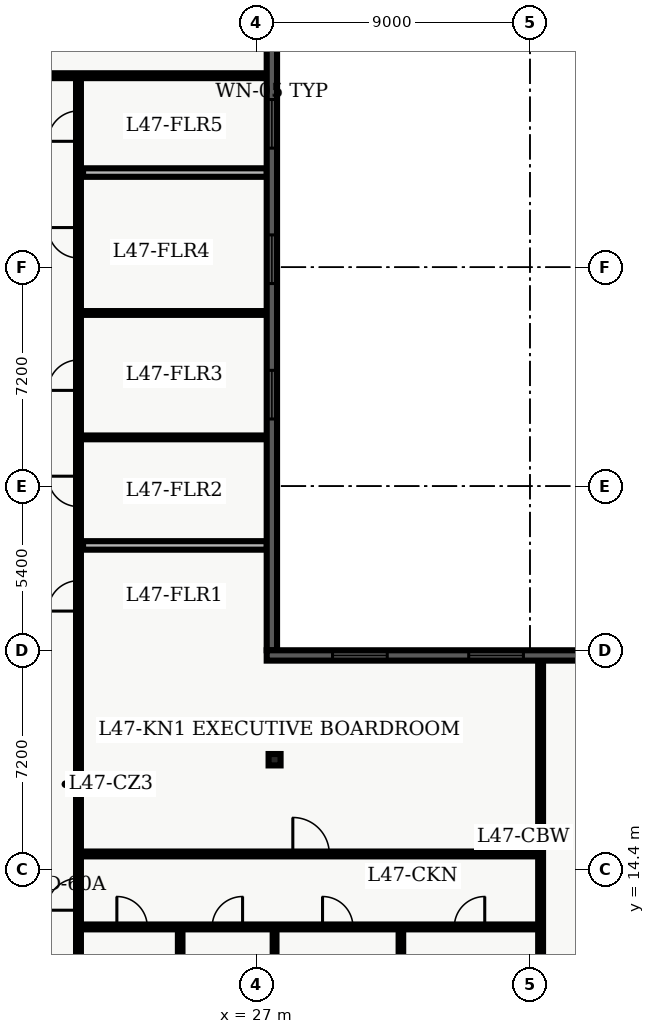
"""IFC4 building model, lengths in metres.
Left out: names, types, materials, properties, quantities, classifications, styles, units other than length and angle.
Written with IfcOpenShell. Run it as: python <this file> out.ifc"""

import sys

from ifc_helpers import new_model, entity, si_unit, converted_unit, direction, frame, origin_with_axes, origin_2d_with_axis, place, context, subcontext, project, spatial, polyline, rectangle, i_section, outline, extrude, element, fill, save


model = new_model("IFC4")
c1 = context("Model", 3, precision=1e-05, world=origin_with_axes(), true_north=direction((0.0, 1.0)))
c2 = subcontext(c1, "Body", "Model", "MODEL_VIEW")
j1 = project(units=[si_unit("LENGTHUNIT", "METRE"), converted_unit("PLANEANGLEUNIT", "DEGREE", entity("IfcPlaneAngleMeasure", 0.017), si_unit("PLANEANGLEUNIT", "RADIAN"), dimensions=[0, 0, 0, 0, 0, 0, 0])], contexts=[c1])
p1 = place(None, origin_with_axes())
s1 = spatial("IfcSite", under=j1, at=p1, CompositionType="ELEMENT")
p2 = place(p1, origin_with_axes())
s2 = spatial("IfcBuilding", under=s1, at=p2, CompositionType="ELEMENT")
p3 = place(p2, frame((0.0, 0.0, 192.6), z_axis=(0.0, 0.0, 1.0), x_axis=(1.0, 0.0, 0.0)))
s3 = spatial("IfcBuildingStorey", under=s2, at=p3, CompositionType="ELEMENT", Elevation=192.6)
p4 = place(p3, frame((27.6, 18.0, 0.0), z_axis=(0.0, 0.0, 1.0), x_axis=(1.0, 0.0, 0.0)))
e1 = element("IfcColumn", 1, at=p4, inside=s3, PredefinedType="COLUMN", context=c2, shape_type="SweptSolid", body=[
    extrude(i_section(OverallWidth=0.394, OverallDepth=0.375, WebThickness=0.017, FlangeThickness=0.028, FilletRadius=0.02, at=origin_2d_with_axis()), origin_with_axes(), (0.0, 0.0, 1.0), 3.9),
])
p5 = place(p3, frame((2.6, 40.5, 0.0), z_axis=(0.0, 0.0, 1.0), x_axis=(1.0, 0.0, 0.0)))
e2 = element("IfcWall", 2, at=p5, inside=s3, PredefinedType="PARTITIONING", context=c2, shape_type="SweptSolid", body=[
    extrude(outline(polyline([(0.0, -0.08), (24.746, -0.08), (24.746, 0.08), (0.0, 0.08), (0.0, -0.08)])), origin_with_axes(), (0.0, 0.0, 1.0), 2.7),
])
p6 = place(p5, frame((1.554, 0.0, 0.0), z_axis=(0.0, 0.0, 1.0), x_axis=(1.0, 0.0, 0.0)))
e3 = element("IfcOpeningElement", 3, at=p6, cuts=e2, PredefinedType="OPENING", context=c2, shape_type="SweptSolid", body=[
    extrude(rectangle(XDim=1.0, YDim=0.18, at=origin_2d_with_axis()), origin_with_axes(), (0.0, 0.0, 1.0), 2.15),
])
p7 = place(p5, frame((6.84, 0.0, 0.0), z_axis=(0.0, 0.0, 1.0), x_axis=(1.0, 0.0, 0.0)))
e4 = element("IfcOpeningElement", 4, at=p7, cuts=e2, PredefinedType="OPENING", context=c2, shape_type="SweptSolid", body=[
    extrude(rectangle(XDim=1.0, YDim=0.18, at=origin_2d_with_axis()), origin_with_axes(), (0.0, 0.0, 1.0), 2.15),
])
p8 = place(p5, frame((11.276, 0.0, 0.0), z_axis=(0.0, 0.0, 1.0), x_axis=(1.0, 0.0, 0.0)))
e5 = element("IfcOpeningElement", 5, at=p8, cuts=e2, PredefinedType="OPENING", context=c2, shape_type="SweptSolid", body=[
    extrude(rectangle(XDim=1.0, YDim=0.18, at=origin_2d_with_axis()), origin_with_axes(), (0.0, 0.0, 1.0), 2.15),
])
p9 = place(p5, frame((15.636, 0.0, 0.0), z_axis=(0.0, 0.0, 1.0), x_axis=(1.0, 0.0, 0.0)))
e6 = element("IfcOpeningElement", 6, at=p9, cuts=e2, PredefinedType="OPENING", context=c2, shape_type="SweptSolid", body=[
    extrude(rectangle(XDim=1.0, YDim=0.18, at=origin_2d_with_axis()), origin_with_axes(), (0.0, 0.0, 1.0), 2.15),
])
p10 = place(p3, frame((21.15, 7.8, 0.0), z_axis=(0.0, 0.0, 1.0), x_axis=(0.0, 1.0, 0.0)))
e7 = element("IfcWall", 7, at=p10, inside=s3, PredefinedType="PARTITIONING", context=c2, shape_type="SweptSolid", body=[
    extrude(outline(polyline([(0.0, -0.08), (32.7, -0.08), (32.7, 0.08), (0.0, 0.08), (0.0, -0.08)])), origin_with_axes(), (0.0, 0.0, 1.0), 2.7),
])
p11 = place(p10, frame((15.589, 0.0, 0.0), z_axis=(0.0, 0.0, 1.0), x_axis=(1.0, 0.0, 0.0)))
e8 = element("IfcOpeningElement", 8, at=p11, cuts=e7, PredefinedType="OPENING", context=c2, shape_type="SweptSolid", body=[
    extrude(rectangle(XDim=1.0, YDim=0.18, at=origin_2d_with_axis()), origin_with_axes(), (0.0, 0.0, 1.0), 2.15),
])
p12 = place(p10, frame((19.026, 0.0, 0.0), z_axis=(0.0, 0.0, 1.0), x_axis=(1.0, 0.0, 0.0)))
e9 = element("IfcOpeningElement", 9, at=p12, cuts=e7, PredefinedType="OPENING", context=c2, shape_type="SweptSolid", body=[
    extrude(rectangle(XDim=1.0, YDim=0.18, at=origin_2d_with_axis()), origin_with_axes(), (0.0, 0.0, 1.0), 2.15),
])
p13 = place(p10, frame((22.849, 0.0, 0.0), z_axis=(0.0, 0.0, 1.0), x_axis=(1.0, 0.0, 0.0)))
e10 = element("IfcOpeningElement", 10, at=p13, cuts=e7, PredefinedType="OPENING", context=c2, shape_type="SweptSolid", body=[
    extrude(rectangle(XDim=1.0, YDim=0.18, at=origin_2d_with_axis()), origin_with_axes(), (0.0, 0.0, 1.0), 2.15),
])
p14 = place(p10, frame((27.204, 0.0, 0.0), z_axis=(0.0, 0.0, 1.0), x_axis=(1.0, 0.0, 0.0)))
e11 = element("IfcOpeningElement", 11, at=p14, cuts=e7, PredefinedType="OPENING", context=c2, shape_type="SweptSolid", body=[
    extrude(rectangle(XDim=1.0, YDim=0.18, at=origin_2d_with_axis()), origin_with_axes(), (0.0, 0.0, 1.0), 2.15),
])
p15 = place(p10, frame((31.042, 0.0, 0.0), z_axis=(0.0, 0.0, 1.0), x_axis=(1.0, 0.0, 0.0)))
e12 = element("IfcOpeningElement", 12, at=p15, cuts=e7, PredefinedType="OPENING", context=c2, shape_type="SweptSolid", body=[
    extrude(rectangle(XDim=1.0, YDim=0.18, at=origin_2d_with_axis()), origin_with_axes(), (0.0, 0.0, 1.0), 2.15),
])
p16 = place(p10, frame((5.775, 0.0, 0.0), z_axis=(0.0, 0.0, 1.0), x_axis=(1.0, 0.0, 0.0)))
e13 = element("IfcOpeningElement", 13, at=p16, cuts=e7, PredefinedType="OPENING", context=c2, shape_type="SweptSolid", body=[
    extrude(rectangle(XDim=1.05, YDim=0.18, at=origin_2d_with_axis()), origin_with_axes(), (0.0, 0.0, 1.0), 2.15),
])
p17 = place(p3, frame((21.3, 25.049, 0.0), z_axis=(0.0, 0.0, 1.0), x_axis=(1.0, 0.0, 0.0)))
e14 = element("IfcWall", 14, at=p17, inside=s3, PredefinedType="PARTITIONING", context=c2, shape_type="SweptSolid", body=[
    extrude(outline(polyline([(0.0, -0.14), (6.046, -0.14), (6.046, 0.14), (0.0, 0.14), (0.0, -0.14)])), origin_with_axes(), (0.0, 0.0, 1.0), 2.7),
])
for number, where, z_axis, x_axis in (
    (15, (21.3, 28.603, 0.0), (0.0, 0.0, 1.0), (1.0, 0.0, 0.0)),
    (16, (21.3, 32.695, 0.0), (0.0, 0.0, 1.0), (1.0, 0.0, 0.0)),
):
    element("IfcWall", number, at=place(p3, frame(where, z_axis=z_axis, x_axis=x_axis)), inside=s3, PredefinedType="PARTITIONING", context=c2, shape_type="SweptSolid", body=[
        extrude(outline(polyline([(0.0, -0.062), (6.046, -0.062), (6.046, 0.062), (0.0, 0.062), (0.0, -0.062)])), origin_with_axes(), (0.0, 0.0, 1.0), 2.7),
    ])
p18 = place(p3, frame((21.3, 37.314, 0.0), z_axis=(0.0, 0.0, 1.0), x_axis=(1.0, 0.0, 0.0)))
e17 = element("IfcWall", 17, at=p18, inside=s3, PredefinedType="PARTITIONING", context=c2, shape_type="SweptSolid", body=[
    extrude(outline(polyline([(0.0, -0.14), (6.046, -0.14), (6.046, 0.14), (0.0, 0.14), (0.0, -0.14)])), origin_with_axes(), (0.0, 0.0, 1.0), 2.7),
])
p19 = place(p3, frame((21.15, 12.5, 0.0), z_axis=(0.0, 0.0, 1.0), x_axis=(1.0, 0.0, 0.0)))
e18 = element("IfcWall", 18, at=p19, inside=s3, PredefinedType="PARTITIONING", context=c2, shape_type="SweptSolid", body=[
    extrude(outline(polyline([(0.0, -0.08), (15.2, -0.08), (15.2, 0.08), (0.0, 0.08), (0.0, -0.08)])), origin_with_axes(), (0.0, 0.0, 1.0), 2.7),
])
p20 = place(p19, frame((1.762, 0.0, 0.0), z_axis=(0.0, 0.0, 1.0), x_axis=(1.0, 0.0, 0.0)))
e19 = element("IfcOpeningElement", 19, at=p20, cuts=e18, PredefinedType="OPENING", context=c2, shape_type="SweptSolid", body=[
    extrude(rectangle(XDim=1.0, YDim=0.18, at=origin_2d_with_axis()), origin_with_axes(), (0.0, 0.0, 1.0), 2.15),
])
p21 = place(p19, frame((4.897, 0.0, 0.0), z_axis=(0.0, 0.0, 1.0), x_axis=(1.0, 0.0, 0.0)))
e20 = element("IfcOpeningElement", 20, at=p21, cuts=e18, PredefinedType="OPENING", context=c2, shape_type="SweptSolid", body=[
    extrude(rectangle(XDim=1.0, YDim=0.18, at=origin_2d_with_axis()), origin_with_axes(), (0.0, 0.0, 1.0), 2.15),
])
p22 = place(p19, frame((8.527, 0.0, 0.0), z_axis=(0.0, 0.0, 1.0), x_axis=(1.0, 0.0, 0.0)))
e21 = element("IfcOpeningElement", 21, at=p22, cuts=e18, PredefinedType="OPENING", context=c2, shape_type="SweptSolid", body=[
    extrude(rectangle(XDim=1.0, YDim=0.18, at=origin_2d_with_axis()), origin_with_axes(), (0.0, 0.0, 1.0), 2.15),
])
p23 = place(p19, frame((12.863, 0.0, 0.0), z_axis=(0.0, 0.0, 1.0), x_axis=(1.0, 0.0, 0.0)))
e22 = element("IfcOpeningElement", 22, at=p23, cuts=e18, PredefinedType="OPENING", context=c2, shape_type="SweptSolid", body=[
    extrude(rectangle(XDim=1.0, YDim=0.18, at=origin_2d_with_axis()), origin_with_axes(), (0.0, 0.0, 1.0), 2.15),
])
p24 = place(p3, frame((21.15, 14.9, 0.0), z_axis=(0.0, 0.0, 1.0), x_axis=(1.0, 0.0, 0.0)))
e23 = element("IfcWall", 23, at=p24, inside=s3, PredefinedType="PARTITIONING", context=c2, shape_type="SweptSolid", body=[
    extrude(outline(polyline([(0.0, -0.08), (15.2, -0.08), (15.2, 0.08), (0.0, 0.08), (0.0, -0.08)])), origin_with_axes(), (0.0, 0.0, 1.0), 2.7),
])
p25 = place(p24, frame((7.65, 0.0, 0.0), z_axis=(0.0, 0.0, 1.0), x_axis=(1.0, 0.0, 0.0)))
e24 = element("IfcOpeningElement", 24, at=p25, cuts=e23, PredefinedType="OPENING", context=c2, shape_type="SweptSolid", body=[
    extrude(rectangle(XDim=1.2, YDim=0.18, at=origin_2d_with_axis()), origin_with_axes(), (0.0, 0.0, 1.0), 2.2),
])
p26 = place(p3, frame((36.35, 4.35, 0.0), z_axis=(0.0, 0.0, 1.0), x_axis=(0.0, 1.0, 0.0)))
e25 = element("IfcWall", 25, at=p26, inside=s3, PredefinedType="PARTITIONING", context=c2, shape_type="SweptSolid", body=[
    extrude(outline(polyline([(0.0, -0.08), (16.95, -0.08), (16.95, 0.08), (0.0, 0.08), (0.0, -0.08)])), origin_with_axes(), (0.0, 0.0, 1.0), 2.7),
])
p27 = place(p3, frame((24.495, 0.335, 0.0), z_axis=(0.0, 0.0, 1.0), x_axis=(0.0, 1.0, 0.0)))
e26 = element("IfcWall", 26, at=p27, inside=s3, PredefinedType="PARTITIONING", context=c2, shape_type="SweptSolid", body=[
    extrude(outline(polyline([(0.0, -0.075), (12.045, -0.075), (12.045, 0.075), (0.0, 0.075), (0.0, -0.075)])), origin_with_axes(), (0.0, 0.0, 1.0), 2.7),
])
p28 = place(p3, frame((27.6, 0.335, 0.0), z_axis=(0.0, 0.0, 1.0), x_axis=(0.0, 1.0, 0.0)))
e27 = element("IfcWall", 27, at=p28, inside=s3, PredefinedType="PARTITIONING", context=c2, shape_type="SweptSolid", body=[
    extrude(outline(polyline([(0.0, -0.062), (12.045, -0.062), (12.045, 0.062), (0.0, 0.062), (0.0, -0.062)])), origin_with_axes(), (0.0, 0.0, 1.0), 2.7),
])
p29 = place(p3, frame((31.755, 0.335, 0.0), z_axis=(0.0, 0.0, 1.0), x_axis=(0.0, 1.0, 0.0)))
e28 = element("IfcWall", 28, at=p29, inside=s3, PredefinedType="PARTITIONING", context=c2, shape_type="SweptSolid", body=[
    extrude(outline(polyline([(0.0, -0.075), (12.045, -0.075), (12.045, 0.075), (0.0, 0.075), (0.0, -0.075)])), origin_with_axes(), (0.0, 0.0, 1.0), 2.7),
])
p30 = place(p3, frame((27.511, 42.42, 0.0), z_axis=(0.0, 0.0, 1.0), x_axis=(0.0, -1.0, 0.0)))
e29 = element("IfcWall", 29, at=p30, inside=s3, PredefinedType="SOLIDWALL", context=c2, shape_type="SweptSolid", body=[
    extrude(outline(polyline([(0.0, -0.17), (20.82, -0.17), (20.82, 0.17), (0.0, 0.17), (0.0, -0.17)])), origin_with_axes(), (0.0, 0.0, 1.0), 3.66),
])
p31 = place(p30, frame((3.503, 0.0, 0.45), z_axis=(0.0, 0.0, 1.0), x_axis=(1.0, 0.0, 0.0)))
e30 = element("IfcOpeningElement", 30, at=p31, cuts=e29, PredefinedType="OPENING", context=c2, shape_type="SweptSolid", body=[
    extrude(rectangle(XDim=1.6, YDim=0.36, at=origin_2d_with_axis()), origin_with_axes(), (0.0, 0.0, 1.0), 2.2),
])
p32 = place(p30, frame((7.957, 0.0, 0.45), z_axis=(0.0, 0.0, 1.0), x_axis=(1.0, 0.0, 0.0)))
e31 = element("IfcOpeningElement", 31, at=p32, cuts=e29, PredefinedType="OPENING", context=c2, shape_type="SweptSolid", body=[
    extrude(rectangle(XDim=1.6, YDim=0.36, at=origin_2d_with_axis()), origin_with_axes(), (0.0, 0.0, 1.0), 2.2),
])
p33 = place(p30, frame((12.412, 0.0, 0.45), z_axis=(0.0, 0.0, 1.0), x_axis=(1.0, 0.0, 0.0)))
e32 = element("IfcOpeningElement", 32, at=p33, cuts=e29, PredefinedType="OPENING", context=c2, shape_type="SweptSolid", body=[
    extrude(rectangle(XDim=1.6, YDim=0.36, at=origin_2d_with_axis()), origin_with_axes(), (0.0, 0.0, 1.0), 2.2),
])
p34 = place(p3, frame((27.341, 21.43, 0.0), z_axis=(0.0, 0.0, 1.0), x_axis=(1.0, 0.0, 0.0)))
e33 = element("IfcWall", 33, at=p34, inside=s3, PredefinedType="SOLIDWALL", context=c2, shape_type="SweptSolid", body=[
    extrude(outline(polyline([(0.0, -0.17), (11.059, -0.17), (11.059, 0.17), (0.0, 0.17), (0.0, -0.17)])), origin_with_axes(), (0.0, 0.0, 1.0), 3.66),
])
p35 = place(p34, frame((3.065, 0.0, 0.45), z_axis=(0.0, 0.0, 1.0), x_axis=(1.0, 0.0, 0.0)))
e34 = element("IfcOpeningElement", 34, at=p35, cuts=e33, PredefinedType="OPENING", context=c2, shape_type="SweptSolid", body=[
    extrude(rectangle(XDim=1.8, YDim=0.36, at=origin_2d_with_axis()), origin_with_axes(), (0.0, 0.0, 1.0), 2.1),
])
p36 = place(p34, frame((7.544, 0.0, 0.45), z_axis=(0.0, 0.0, 1.0), x_axis=(1.0, 0.0, 0.0)))
e35 = element("IfcOpeningElement", 35, at=p36, cuts=e33, PredefinedType="OPENING", context=c2, shape_type="SweptSolid", body=[
    extrude(rectangle(XDim=1.8, YDim=0.36, at=origin_2d_with_axis()), origin_with_axes(), (0.0, 0.0, 1.0), 2.1),
])
p37 = place(p10, frame((15.589, 0.0, 0.0), z_axis=(0.0, 0.0, 1.0), x_axis=(1.0, 0.0, 0.0)))
e36 = element("IfcDoor", 36, at=p37, inside=s3, OperationType="SINGLE_SWING_LEFT", PredefinedType="DOOR", context=c2, shape_type="SweptSolid", body=[
    extrude(rectangle(XDim=1.0, YDim=0.09, at=origin_2d_with_axis()), origin_with_axes(), (0.0, 0.0, 1.0), 2.15),
])
fill(e8, e36)
p38 = place(p10, frame((19.026, 0.0, 0.0), z_axis=(0.0, 0.0, 1.0), x_axis=(1.0, 0.0, 0.0)))
e37 = element("IfcDoor", 37, at=p38, inside=s3, OperationType="SINGLE_SWING_RIGHT", PredefinedType="DOOR", context=c2, shape_type="SweptSolid", body=[
    extrude(rectangle(XDim=1.0, YDim=0.09, at=origin_2d_with_axis()), origin_with_axes(), (0.0, 0.0, 1.0), 2.15),
])
fill(e9, e37)
p39 = place(p10, frame((22.849, 0.0, 0.0), z_axis=(0.0, 0.0, 1.0), x_axis=(1.0, 0.0, 0.0)))
e38 = element("IfcDoor", 38, at=p39, inside=s3, OperationType="SINGLE_SWING_LEFT", PredefinedType="DOOR", context=c2, shape_type="SweptSolid", body=[
    extrude(rectangle(XDim=1.0, YDim=0.09, at=origin_2d_with_axis()), origin_with_axes(), (0.0, 0.0, 1.0), 2.15),
])
fill(e10, e38)
p40 = place(p10, frame((27.204, 0.0, 0.0), z_axis=(0.0, 0.0, 1.0), x_axis=(1.0, 0.0, 0.0)))
e39 = element("IfcDoor", 39, at=p40, inside=s3, OperationType="SINGLE_SWING_RIGHT", PredefinedType="DOOR", context=c2, shape_type="SweptSolid", body=[
    extrude(rectangle(XDim=1.0, YDim=0.09, at=origin_2d_with_axis()), origin_with_axes(), (0.0, 0.0, 1.0), 2.15),
])
fill(e11, e39)
p41 = place(p10, frame((31.042, 0.0, 0.0), z_axis=(0.0, 0.0, 1.0), x_axis=(1.0, 0.0, 0.0)))
e40 = element("IfcDoor", 40, at=p41, inside=s3, OperationType="SINGLE_SWING_LEFT", PredefinedType="DOOR", context=c2, shape_type="SweptSolid", body=[
    extrude(rectangle(XDim=1.0, YDim=0.09, at=origin_2d_with_axis()), origin_with_axes(), (0.0, 0.0, 1.0), 2.15),
])
fill(e12, e40)
p42 = place(p10, frame((5.775, 0.0, 0.0), z_axis=(0.0, 0.0, 1.0), x_axis=(1.0, 0.0, 0.0)))
e41 = element("IfcDoor", 41, at=p42, inside=s3, OperationType="SINGLE_SWING_LEFT", PredefinedType="DOOR", context=c2, shape_type="SweptSolid", body=[
    extrude(rectangle(XDim=1.05, YDim=0.09, at=origin_2d_with_axis()), origin_with_axes(), (0.0, 0.0, 1.0), 2.15),
])
fill(e13, e41)
p43 = place(p19, frame((1.762, 0.0, 0.0), z_axis=(0.0, 0.0, 1.0), x_axis=(1.0, 0.0, 0.0)))
e42 = element("IfcDoor", 42, at=p43, inside=s3, OperationType="SINGLE_SWING_LEFT", PredefinedType="DOOR", context=c2, shape_type="SweptSolid", body=[
    extrude(rectangle(XDim=1.0, YDim=0.09, at=origin_2d_with_axis()), origin_with_axes(), (0.0, 0.0, 1.0), 2.15),
])
fill(e19, e42)
p44 = place(p19, frame((4.897, 0.0, 0.0), z_axis=(0.0, 0.0, 1.0), x_axis=(1.0, 0.0, 0.0)))
e43 = element("IfcDoor", 43, at=p44, inside=s3, OperationType="SINGLE_SWING_RIGHT", PredefinedType="DOOR", context=c2, shape_type="SweptSolid", body=[
    extrude(rectangle(XDim=1.0, YDim=0.09, at=origin_2d_with_axis()), origin_with_axes(), (0.0, 0.0, 1.0), 2.15),
])
fill(e20, e43)
p45 = place(p19, frame((8.527, 0.0, 0.0), z_axis=(0.0, 0.0, 1.0), x_axis=(1.0, 0.0, 0.0)))
e44 = element("IfcDoor", 44, at=p45, inside=s3, OperationType="SINGLE_SWING_LEFT", PredefinedType="DOOR", context=c2, shape_type="SweptSolid", body=[
    extrude(rectangle(XDim=1.0, YDim=0.09, at=origin_2d_with_axis()), origin_with_axes(), (0.0, 0.0, 1.0), 2.15),
])
fill(e21, e44)
p46 = place(p19, frame((12.863, 0.0, 0.0), z_axis=(0.0, 0.0, 1.0), x_axis=(1.0, 0.0, 0.0)))
e45 = element("IfcDoor", 45, at=p46, inside=s3, OperationType="SINGLE_SWING_RIGHT", PredefinedType="DOOR", context=c2, shape_type="SweptSolid", body=[
    extrude(rectangle(XDim=1.0, YDim=0.09, at=origin_2d_with_axis()), origin_with_axes(), (0.0, 0.0, 1.0), 2.15),
])
fill(e22, e45)
p47 = place(p24, frame((7.65, 0.0, 0.0), z_axis=(0.0, 0.0, 1.0), x_axis=(1.0, 0.0, 0.0)))
e46 = element("IfcDoor", 46, at=p47, inside=s3, OperationType="SINGLE_SWING_LEFT", PredefinedType="DOOR", context=c2, shape_type="SweptSolid", body=[
    extrude(rectangle(XDim=1.2, YDim=0.09, at=origin_2d_with_axis()), origin_with_axes(), (0.0, 0.0, 1.0), 2.2),
])
fill(e24, e46)
p48 = place(p30, frame((3.503, 0.0, 0.45), z_axis=(0.0, 0.0, 1.0), x_axis=(1.0, 0.0, 0.0)))
e47 = element("IfcWindow", 47, at=p48, inside=s3, PredefinedType="WINDOW", context=c2, shape_type="SweptSolid", body=[
    extrude(rectangle(XDim=1.6, YDim=0.09, at=origin_2d_with_axis()), origin_with_axes(), (0.0, 0.0, 1.0), 2.2),
])
fill(e30, e47)
p49 = place(p30, frame((7.957, 0.0, 0.45), z_axis=(0.0, 0.0, 1.0), x_axis=(1.0, 0.0, 0.0)))
e48 = element("IfcWindow", 48, at=p49, inside=s3, PredefinedType="WINDOW", context=c2, shape_type="SweptSolid", body=[
    extrude(rectangle(XDim=1.6, YDim=0.09, at=origin_2d_with_axis()), origin_with_axes(), (0.0, 0.0, 1.0), 2.2),
])
fill(e31, e48)
p50 = place(p30, frame((12.412, 0.0, 0.45), z_axis=(0.0, 0.0, 1.0), x_axis=(1.0, 0.0, 0.0)))
e49 = element("IfcWindow", 49, at=p50, inside=s3, PredefinedType="WINDOW", context=c2, shape_type="SweptSolid", body=[
    extrude(rectangle(XDim=1.6, YDim=0.09, at=origin_2d_with_axis()), origin_with_axes(), (0.0, 0.0, 1.0), 2.2),
])
fill(e32, e49)
p51 = place(p34, frame((3.065, 0.0, 0.45), z_axis=(0.0, 0.0, 1.0), x_axis=(1.0, 0.0, 0.0)))
e50 = element("IfcWindow", 50, at=p51, inside=s3, PredefinedType="WINDOW", context=c2, shape_type="SweptSolid", body=[
    extrude(rectangle(XDim=1.8, YDim=0.09, at=origin_2d_with_axis()), origin_with_axes(), (0.0, 0.0, 1.0), 2.1),
])
fill(e34, e50)
p52 = place(p34, frame((7.544, 0.0, 0.45), z_axis=(0.0, 0.0, 1.0), x_axis=(1.0, 0.0, 0.0)))
e51 = element("IfcWindow", 51, at=p52, inside=s3, PredefinedType="WINDOW", context=c2, shape_type="SweptSolid", body=[
    extrude(rectangle(XDim=1.8, YDim=0.09, at=origin_2d_with_axis()), origin_with_axes(), (0.0, 0.0, 1.0), 2.1),
])
fill(e35, e51)
save(model, sys.argv[1])
